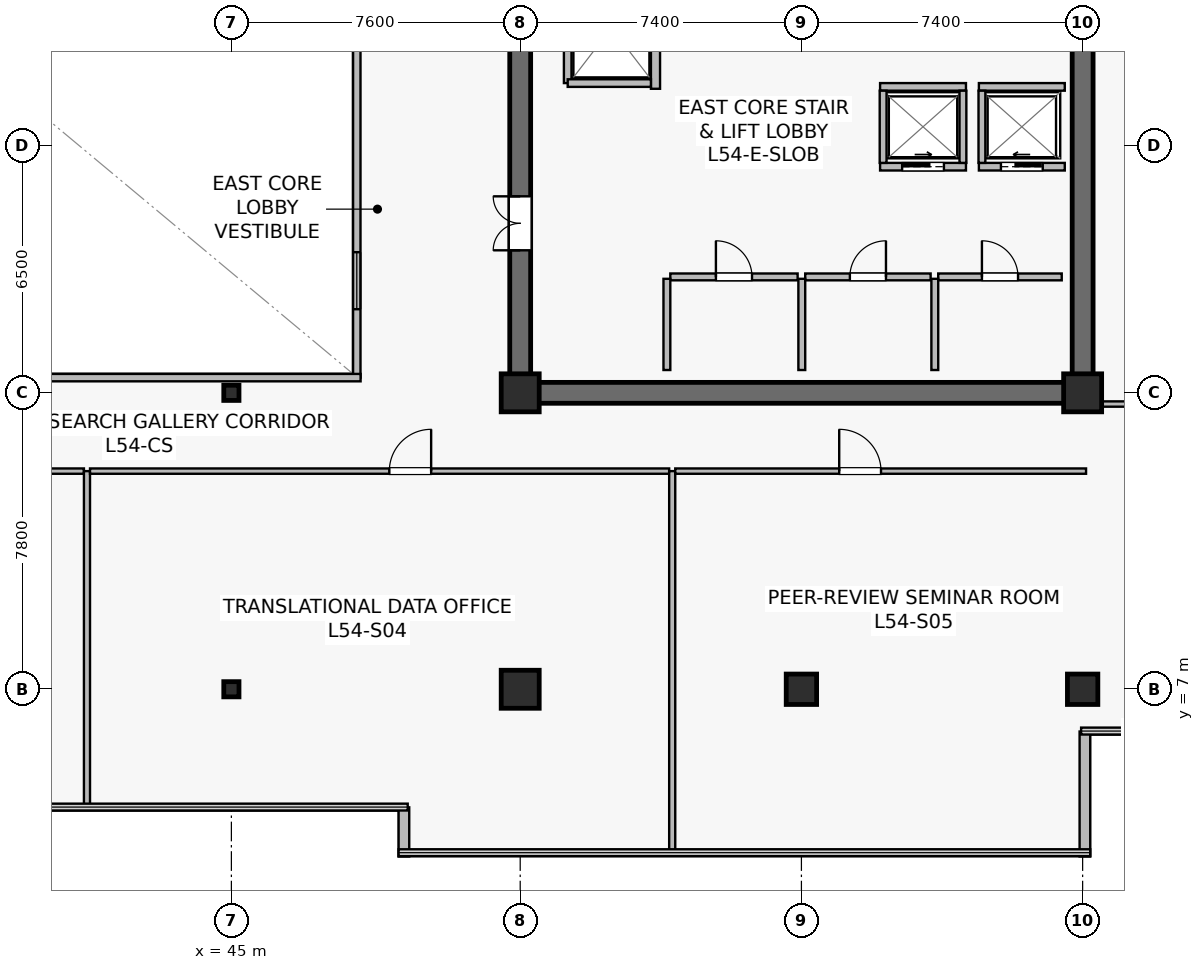
"""IFC4 building model, lengths in metres.
Left out: names, types, materials, properties, quantities, classifications, styles, units other than length and angle.
Written with IfcOpenShell. Run it as: python <this file> out.ifc"""

import sys

from ifc_helpers import new_model, si_unit, direction, frame, frame_2d, origin, origin_2d, place, context, subcontext, project, spatial, rectangle, hollow_rectangle, extrude, source, transform, mapped, element, fill, save


model = new_model("IFC4")
c1 = context("Model", 3, precision=1e-05, world=origin(), true_north=direction((0.0, 1.0)))
c2 = subcontext(c1, "Body", "Model", "MODEL_VIEW")
j1 = project(units=[si_unit("LENGTHUNIT", "METRE"), si_unit("PLANEANGLEUNIT", "RADIAN")], contexts=[c1])
p1 = place(None, origin())
s1 = spatial("IfcSite", under=j1, at=p1, CompositionType="ELEMENT")
p2 = place(p1, origin())
s2 = spatial("IfcBuilding", under=s1, at=p2, CompositionType="ELEMENT")
p3 = place(p2, frame((0.0, 0.0, 226.0)))
s3 = spatial("IfcBuildingStorey", under=s2, at=p3, CompositionType="ELEMENT", Elevation=226.0)
p4 = place(p3, frame((52.325, 14.8, 0.0), z_axis=(0.0, 0.0, 1.0), x_axis=(1.0, 0.0, 0.0)))
e1 = element("IfcWall", 1, at=p4, inside=s3, PredefinedType="SHEAR", context=c2, shape_type="SweptSolid", body=[
    extrude(rectangle(XDim=15.35, YDim=0.55, at=frame_2d((7.675, 0.0))), origin(), (0.0, 0.0, 1.0), 3.8),
])
p5 = place(p3, frame((52.6, 15.075, 0.0), z_axis=(0.0, 0.0, 1.0), x_axis=(0.0, 1.0, 0.0)))
e2 = element("IfcWall", 2, at=p5, inside=s3, PredefinedType="SHEAR", context=c2, shape_type="SweptSolid", body=[
    extrude(rectangle(XDim=18.45, YDim=0.55, at=frame_2d((9.225, 0.0))), origin(), (0.0, 0.0, 1.0), 3.8),
])
p6 = place(p5, frame((3.475, 0.0, 0.0)))
e3 = element("IfcOpeningElement", 3, at=p6, cuts=e2, PredefinedType="OPENING", context=c2, shape_type="SweptSolid", body=[
    extrude(rectangle(XDim=1.42, YDim=2.2, at=frame_2d((0.71, 1.1))), frame((0.0, 0.285, 0.0), z_axis=(0.0, -1.0, 0.0), x_axis=(1.0, 0.0, 0.0)), (0.0, 0.0, 1.0), 0.57),
])
p7 = place(p3, frame((67.4, 15.075, 0.0), z_axis=(0.0, 0.0, 1.0), x_axis=(0.0, 1.0, 0.0)))
e4 = element("IfcWall", 4, at=p7, inside=s3, PredefinedType="SHEAR", context=c2, shape_type="SweptSolid", body=[
    extrude(rectangle(XDim=18.45, YDim=0.55, at=frame_2d((9.225, 0.0))), origin(), (0.0, 0.0, 1.0), 3.8),
])
m1 = source(origin(), c2, "Body", "SweptSolid", [
    extrude(rectangle(XDim=1.0, YDim=1.0, at=origin_2d()), origin(), (0.0, 0.0, 1.0), 4.1),
])
p8 = place(p3, frame((52.6, 7.0, 0.0), z_axis=(0.0, 0.0, 1.0), x_axis=(1.0, 0.0, 0.0)))
e5 = element("IfcColumn", 5, at=p8, inside=s3, PredefinedType="COLUMN", context=c2, shape_type="MappedRepresentation", body=[
    mapped(m1, transform((0.0, 0.0, 0.0), scale=1.0)),
])
m2 = source(origin(), c2, "Body", "SweptSolid", [
    extrude(rectangle(XDim=0.8, YDim=0.8, at=origin_2d()), origin(), (0.0, 0.0, 1.0), 4.1),
])
p9 = place(p3, frame((60.0, 7.0, 0.0), z_axis=(0.0, 0.0, 1.0), x_axis=(1.0, 0.0, 0.0)))
e6 = element("IfcColumn", 6, at=p9, inside=s3, PredefinedType="COLUMN", context=c2, shape_type="MappedRepresentation", body=[
    mapped(m2, transform((0.0, 0.0, 0.0), scale=1.0)),
])
for number, where, z_axis, x_axis in (
    (7, (52.6, 14.8, 0.0), (0.0, 0.0, 1.0), (1.0, 0.0, 0.0)),
    (8, (67.4, 14.8, 0.0), (0.0, 0.0, 1.0), (1.0, 0.0, 0.0)),
):
    element("IfcColumn", number, at=place(p3, frame(where, z_axis=z_axis, x_axis=x_axis)), inside=s3, PredefinedType="COLUMN", context=c2, shape_type="MappedRepresentation", body=[
        mapped(m1, transform((0.0, 0.0, 0.0), scale=1.0)),
    ])
p10 = place(p3, frame((67.4, 7.0, 0.0), z_axis=(0.0, 0.0, 1.0), x_axis=(1.0, 0.0, 0.0)))
e9 = element("IfcColumn", 9, at=p10, inside=s3, PredefinedType="COLUMN", context=c2, shape_type="MappedRepresentation", body=[
    mapped(m2, transform((0.0, 0.0, 0.0), scale=1.0)),
])
m3 = source(origin(), c2, "Body", "SweptSolid", [
    extrude(hollow_rectangle(XDim=0.4, YDim=0.4, WallThickness=0.019, at=origin_2d()), origin(), (0.0, 0.0, 1.0), 4.1),
])
for number, where, z_axis, x_axis in (
    (10, (45.0, 7.0, 0.0), (0.0, 0.0, 1.0), (1.0, 0.0, 0.0)),
    (11, (45.0, 14.8, 0.0), (0.0, 0.0, 1.0), (1.0, 0.0, 0.0)),
):
    element("IfcColumn", number, at=place(p3, frame(where, z_axis=z_axis, x_axis=x_axis)), inside=s3, PredefinedType="COLUMN", context=c2, shape_type="MappedRepresentation", body=[
        mapped(m3, transform((0.0, 0.0, 0.0), scale=1.0)),
    ])
p11 = place(p3, frame((49.54, 3.893, 0.0), z_axis=(0.0, 0.0, 1.0), x_axis=(0.0, -1.0, 0.0)))
e12 = element("IfcWall", 12, at=p11, inside=s3, PredefinedType="STANDARD", context=c2, shape_type="SweptSolid", body=[
    extrude(rectangle(XDim=1.293, YDim=0.28, at=frame_2d((0.646, 0.0))), origin(), (0.0, 0.0, 1.0), 3.8),
])
p12 = place(p3, frame((67.46, 2.6, 0.0), z_axis=(0.0, 0.0, 1.0), x_axis=(0.0, 1.0, 0.0)))
e13 = element("IfcWall", 13, at=p12, inside=s3, PredefinedType="STANDARD", context=c2, shape_type="SweptSolid", body=[
    extrude(rectangle(XDim=3.288, YDim=0.28, at=frame_2d((1.644, 0.0))), origin(), (0.0, 0.0, 1.0), 3.8),
])
p13 = place(p3, frame((56.16, 22.8, 0.0), z_axis=(0.0, 0.0, 1.0), x_axis=(0.0, 1.0, 0.0)))
e14 = element("IfcWall", 14, at=p13, inside=s3, PredefinedType="SOLIDWALL", context=c2, shape_type="SweptSolid", body=[
    extrude(rectangle(XDim=6.85, YDim=0.24, at=frame_2d((3.425, 0.0))), origin(), (0.0, 0.0, 1.0), 2.935),
])
p14 = place(p13, frame((4.85, 0.0, 0.0)))
e15 = element("IfcOpeningElement", 15, at=p14, cuts=e14, PredefinedType="OPENING", context=c2, shape_type="SweptSolid", body=[
    extrude(rectangle(XDim=1.1, YDim=2.22, at=frame_2d((0.55, 1.11))), frame((0.0, 0.13, 0.0), z_axis=(0.0, -1.0, 0.0), x_axis=(1.0, 0.0, 0.0)), (0.0, 0.0, 1.0), 0.26),
])
p15 = place(p13, frame((1.0, 0.0, 0.0)))
e16 = element("IfcOpeningElement", 16, at=p15, cuts=e14, PredefinedType="OPENING", context=c2, shape_type="SweptSolid", body=[
    extrude(rectangle(XDim=1.2, YDim=2.22, at=frame_2d((0.6, 1.11))), frame((0.0, 0.13, 0.0), z_axis=(0.0, -1.0, 0.0), x_axis=(1.0, 0.0, 0.0)), (0.0, 0.0, 1.0), 0.26),
])
p16 = place(p3, frame((64.67, 20.75, 0.0), z_axis=(0.0, 0.0, 1.0), x_axis=(1.0, 0.0, 0.0)))
e17 = element("IfcWall", 17, at=p16, inside=s3, PredefinedType="SOLIDWALL", context=c2, shape_type="SweptSolid", body=[
    extrude(rectangle(XDim=2.26, YDim=0.2, at=frame_2d((1.13, 0.0))), origin(), (0.0, 0.0, 1.0), 3.8),
])
p17 = place(p16, frame((0.58, 0.0, 0.0)))
e18 = element("IfcOpeningElement", 18, at=p17, cuts=e17, PredefinedType="OPENING", context=c2, shape_type="SweptSolid", body=[
    extrude(rectangle(XDim=1.1, YDim=2.22, at=frame_2d((0.55, 1.11))), frame((0.0, 0.11, 0.0), z_axis=(0.0, -1.0, 0.0), x_axis=(1.0, 0.0, 0.0)), (0.0, 0.0, 1.0), 0.22),
])
p18 = place(p3, frame((64.67, 22.85, 0.0), z_axis=(0.0, 0.0, 1.0), x_axis=(1.0, 0.0, 0.0)))
e19 = element("IfcWall", 19, at=p18, inside=s3, PredefinedType="SOLIDWALL", context=c2, shape_type="SweptSolid", body=[
    extrude(rectangle(XDim=2.26, YDim=0.2, at=frame_2d((1.13, 0.0))), origin(), (0.0, 0.0, 1.0), 3.8),
])
p19 = place(p3, frame((64.75, 20.85, 0.0), z_axis=(0.0, 0.0, 1.0), x_axis=(0.0, 1.0, 0.0)))
e20 = element("IfcWall", 20, at=p19, inside=s3, PredefinedType="SOLIDWALL", context=c2, shape_type="SweptSolid", body=[
    extrude(rectangle(XDim=1.9, YDim=0.18, at=frame_2d((0.95, 0.0))), origin(), (0.0, 0.0, 1.0), 3.8),
])
p20 = place(p3, frame((62.07, 20.75, 0.0), z_axis=(0.0, 0.0, 1.0), x_axis=(1.0, 0.0, 0.0)))
e21 = element("IfcWall", 21, at=p20, inside=s3, PredefinedType="SOLIDWALL", context=c2, shape_type="SweptSolid", body=[
    extrude(rectangle(XDim=2.26, YDim=0.2, at=frame_2d((1.13, 0.0))), origin(), (0.0, 0.0, 1.0), 3.8),
])
p21 = place(p20, frame((0.58, 0.0, 0.0)))
e22 = element("IfcOpeningElement", 22, at=p21, cuts=e21, PredefinedType="OPENING", context=c2, shape_type="SweptSolid", body=[
    extrude(rectangle(XDim=1.1, YDim=2.22, at=frame_2d((0.55, 1.11))), frame((0.0, 0.11, 0.0), z_axis=(0.0, -1.0, 0.0), x_axis=(1.0, 0.0, 0.0)), (0.0, 0.0, 1.0), 0.22),
])
p22 = place(p3, frame((62.07, 22.85, 0.0), z_axis=(0.0, 0.0, 1.0), x_axis=(1.0, 0.0, 0.0)))
e23 = element("IfcWall", 23, at=p22, inside=s3, PredefinedType="SOLIDWALL", context=c2, shape_type="SweptSolid", body=[
    extrude(rectangle(XDim=2.26, YDim=0.2, at=frame_2d((1.13, 0.0))), origin(), (0.0, 0.0, 1.0), 3.8),
])
for number, where, z_axis, x_axis in (
    (24, (62.15, 20.85, 0.0), (0.0, 0.0, 1.0), (0.0, 1.0, 0.0)),
    (25, (64.25, 20.85, 0.0), (0.0, 0.0, 1.0), (0.0, 1.0, 0.0)),
):
    element("IfcWall", number, at=place(p3, frame(where, z_axis=z_axis, x_axis=x_axis)), inside=s3, PredefinedType="SOLIDWALL", context=c2, shape_type="SweptSolid", body=[
        extrude(rectangle(XDim=1.9, YDim=0.18, at=frame_2d((0.95, 0.0))), origin(), (0.0, 0.0, 1.0), 3.8),
    ])
p23 = place(p3, frame((53.85, 22.95, 0.0), z_axis=(0.0, 0.0, 1.0), x_axis=(0.0, 1.0, 0.0)))
e26 = element("IfcWall", 26, at=p23, inside=s3, PredefinedType="SOLIDWALL", context=c2, shape_type="SweptSolid", body=[
    extrude(rectangle(XDim=2.9, YDim=0.2, at=frame_2d((1.45, 0.0))), origin(), (0.0, 0.0, 1.0), 2.935),
])
p24 = place(p3, frame((53.85, 22.95, 0.0), z_axis=(0.0, 0.0, 1.0), x_axis=(1.0, 0.0, 0.0)))
e27 = element("IfcWall", 27, at=p24, inside=s3, PredefinedType="SOLIDWALL", context=c2, shape_type="SweptSolid", body=[
    extrude(rectangle(XDim=2.19, YDim=0.2, at=frame_2d((1.095, 0.0))), origin(), (0.0, 0.0, 1.0), 3.8),
])
p25 = place(p3, frame((63.6, 17.85, 0.0), z_axis=(0.0, 0.0, 1.0), x_axis=(1.0, 0.0, 0.0)))
e28 = element("IfcWall", 28, at=p25, inside=s3, PredefinedType="SOLIDWALL", context=c2, shape_type="SweptSolid", body=[
    extrude(rectangle(XDim=3.25, YDim=0.18, at=frame_2d((1.625, 0.0))), origin(), (0.0, 0.0, 1.0), 3.8),
])
p26 = place(p25, frame((1.15, 0.0, 0.0)))
e29 = element("IfcOpeningElement", 29, at=p26, cuts=e28, PredefinedType="OPENING", context=c2, shape_type="SweptSolid", body=[
    extrude(rectangle(XDim=0.95, YDim=2.15, at=frame_2d((0.475, 1.075))), frame((0.0, 0.1, 0.0), z_axis=(0.0, -1.0, 0.0), x_axis=(1.0, 0.0, 0.0)), (0.0, 0.0, 1.0), 0.2),
])
p27 = place(p3, frame((63.51, 15.4, 0.0), z_axis=(0.0, 0.0, 1.0), x_axis=(0.0, 1.0, 0.0)))
e30 = element("IfcWall", 30, at=p27, inside=s3, PredefinedType="SOLIDWALL", context=c2, shape_type="SweptSolid", body=[
    extrude(rectangle(XDim=2.4, YDim=0.18, at=frame_2d((1.2, 0.0))), origin(), (0.0, 0.0, 1.0), 3.8),
])
p28 = place(p3, frame((60.1, 17.85, 0.0), z_axis=(0.0, 0.0, 1.0), x_axis=(1.0, 0.0, 0.0)))
e31 = element("IfcWall", 31, at=p28, inside=s3, PredefinedType="SOLIDWALL", context=c2, shape_type="SweptSolid", body=[
    extrude(rectangle(XDim=3.3, YDim=0.18, at=frame_2d((1.65, 0.0))), origin(), (0.0, 0.0, 1.0), 3.197),
])
p29 = place(p28, frame((1.175, 0.0, 0.0)))
e32 = element("IfcOpeningElement", 32, at=p29, cuts=e31, PredefinedType="OPENING", context=c2, shape_type="SweptSolid", body=[
    extrude(rectangle(XDim=0.95, YDim=2.15, at=frame_2d((0.475, 1.075))), frame((0.0, 0.1, 0.0), z_axis=(0.0, -1.0, 0.0), x_axis=(1.0, 0.0, 0.0)), (0.0, 0.0, 1.0), 0.2),
])
p30 = place(p3, frame((60.01, 15.4, 0.0), z_axis=(0.0, 0.0, 1.0), x_axis=(0.0, 1.0, 0.0)))
e33 = element("IfcWall", 33, at=p30, inside=s3, PredefinedType="SOLIDWALL", context=c2, shape_type="SweptSolid", body=[
    extrude(rectangle(XDim=2.4, YDim=0.18, at=frame_2d((1.2, 0.0))), origin(), (0.0, 0.0, 1.0), 3.197),
])
p31 = place(p3, frame((56.55, 17.85, 0.0), z_axis=(0.0, 0.0, 1.0), x_axis=(1.0, 0.0, 0.0)))
e34 = element("IfcWall", 34, at=p31, inside=s3, PredefinedType="SOLIDWALL", context=c2, shape_type="SweptSolid", body=[
    extrude(rectangle(XDim=3.35, YDim=0.18, at=frame_2d((1.675, 0.0))), origin(), (0.0, 0.0, 1.0), 3.197),
])
p32 = place(p31, frame((1.2, 0.0, 0.0)))
e35 = element("IfcOpeningElement", 35, at=p32, cuts=e34, PredefinedType="OPENING", context=c2, shape_type="SweptSolid", body=[
    extrude(rectangle(XDim=0.95, YDim=2.15, at=frame_2d((0.475, 1.075))), frame((0.0, 0.1, 0.0), z_axis=(0.0, -1.0, 0.0), x_axis=(1.0, 0.0, 0.0)), (0.0, 0.0, 1.0), 0.2),
])
p33 = place(p3, frame((56.46, 15.4, 0.0), z_axis=(0.0, 0.0, 1.0), x_axis=(0.0, 1.0, 0.0)))
e36 = element("IfcWall", 36, at=p33, inside=s3, PredefinedType="SOLIDWALL", context=c2, shape_type="SweptSolid", body=[
    extrude(rectangle(XDim=2.4, YDim=0.18, at=frame_2d((1.2, 0.0))), origin(), (0.0, 0.0, 1.0), 3.8),
])
p34 = place(p3, frame((48.3, 15.2, 0.0), z_axis=(0.0, 0.0, 1.0), x_axis=(0.0, 1.0, 0.0)))
e37 = element("IfcWall", 37, at=p34, inside=s3, PredefinedType="SOLIDWALL", context=c2, shape_type="SweptSolid", body=[
    extrude(rectangle(XDim=18.2, YDim=0.195, at=frame_2d((9.1, 0.0))), origin(), (0.0, 0.0, 1.0), 3.8),
])
p35 = place(p34, frame((1.8, 0.0, 0.9)))
e38 = element("IfcOpeningElement", 38, at=p35, cuts=e37, PredefinedType="OPENING", context=c2, shape_type="SweptSolid", body=[
    extrude(rectangle(XDim=1.5, YDim=1.4, at=frame_2d((0.75, 0.7))), frame((0.0, 0.107, 0.0), z_axis=(0.0, -1.0, 0.0), x_axis=(1.0, 0.0, 0.0)), (0.0, 0.0, 1.0), 0.215),
])
p36 = place(p34, frame((13.2, 0.0, 0.9)))
e39 = element("IfcOpeningElement", 39, at=p36, cuts=e37, PredefinedType="OPENING", context=c2, shape_type="SweptSolid", body=[
    extrude(rectangle(XDim=1.5, YDim=1.4, at=frame_2d((0.75, 0.7))), frame((0.0, 0.107, 0.0), z_axis=(0.0, -1.0, 0.0), x_axis=(1.0, 0.0, 0.0)), (0.0, 0.0, 1.0), 0.215),
])
p37 = place(p3, frame((26.4, 15.2, 0.0), z_axis=(0.0, 0.0, 1.0), x_axis=(1.0, 0.0, 0.0)))
e40 = element("IfcWall", 40, at=p37, inside=s3, PredefinedType="SOLIDWALL", context=c2, shape_type="SweptSolid", body=[
    extrude(rectangle(XDim=22.0, YDim=0.195, at=frame_2d((11.0, 0.0))), origin(), (0.0, 0.0, 1.0), 3.8),
])
p38 = place(p3, frame((26.88, 12.74, 0.0), z_axis=(0.0, 0.0, 1.0), x_axis=(1.0, 0.0, 0.0)))
e41 = element("IfcWall", 41, at=p38, inside=s3, PredefinedType="PARTITIONING", context=c2, shape_type="SweptSolid", body=[
    extrude(rectangle(XDim=14.24, YDim=0.14, at=frame_2d((7.12, 0.0))), origin(), (0.0, 0.0, 1.0), 3.197),
])
p39 = place(p38, frame((5.823, 0.0, 0.0)))
e42 = element("IfcOpeningElement", 42, at=p39, cuts=e41, PredefinedType="OPENING", context=c2, shape_type="SweptSolid", body=[
    extrude(rectangle(XDim=1.1, YDim=2.18, at=frame_2d((0.55, 1.09))), frame((0.0, 0.08, 0.0), z_axis=(0.0, -1.0, 0.0), x_axis=(1.0, 0.0, 0.0)), (0.0, 0.0, 1.0), 0.16),
])
p40 = place(p3, frame((41.2, 3.91, 0.0), z_axis=(0.0, 0.0, 1.0), x_axis=(0.0, 1.0, 0.0)))
e43 = element("IfcWall", 43, at=p40, inside=s3, PredefinedType="PARTITIONING", context=c2, shape_type="SweptSolid", body=[
    extrude(rectangle(XDim=8.83, YDim=0.16, at=frame_2d((4.415, 0.0))), origin(), (0.0, 0.0, 1.0), 3.135),
])
p41 = place(p3, frame((41.28, 12.74, 0.0), z_axis=(0.0, 0.0, 1.0), x_axis=(1.0, 0.0, 0.0)))
e44 = element("IfcWall", 44, at=p41, inside=s3, PredefinedType="PARTITIONING", context=c2, shape_type="SweptSolid", body=[
    extrude(rectangle(XDim=15.24, YDim=0.14, at=frame_2d((7.62, 0.0))), origin(), (0.0, 0.0, 1.0), 3.197),
])
p42 = place(p41, frame((7.876, 0.0, 0.0)))
e45 = element("IfcOpeningElement", 45, at=p42, cuts=e44, PredefinedType="OPENING", context=c2, shape_type="SweptSolid", body=[
    extrude(rectangle(XDim=1.1, YDim=2.18, at=frame_2d((0.55, 1.09))), frame((0.0, 0.08, 0.0), z_axis=(0.0, -1.0, 0.0), x_axis=(1.0, 0.0, 0.0)), (0.0, 0.0, 1.0), 0.16),
])
p43 = place(p3, frame((56.6, 2.71, 0.0), z_axis=(0.0, 0.0, 1.0), x_axis=(0.0, 1.0, 0.0)))
e46 = element("IfcWall", 46, at=p43, inside=s3, PredefinedType="PARTITIONING", context=c2, shape_type="SweptSolid", body=[
    extrude(rectangle(XDim=10.03, YDim=0.16, at=frame_2d((5.015, 0.0))), origin(), (0.0, 0.0, 1.0), 3.135),
])
p44 = place(p3, frame((56.68, 12.74, 0.0), z_axis=(0.0, 0.0, 1.0), x_axis=(1.0, 0.0, 0.0)))
e47 = element("IfcWall", 47, at=p44, inside=s3, PredefinedType="PARTITIONING", context=c2, shape_type="SweptSolid", body=[
    extrude(rectangle(XDim=10.81, YDim=0.14, at=frame_2d((5.405, 0.0))), origin(), (0.0, 0.0, 1.0), 3.197),
])
p45 = place(p44, frame((4.314, 0.0, 0.0)))
e48 = element("IfcOpeningElement", 48, at=p45, cuts=e47, PredefinedType="OPENING", context=c2, shape_type="SweptSolid", body=[
    extrude(rectangle(XDim=1.1, YDim=2.18, at=frame_2d((0.55, 1.09))), frame((0.0, 0.08, 0.0), z_axis=(0.0, -1.0, 0.0), x_axis=(1.0, 0.0, 0.0)), (0.0, 0.0, 1.0), 0.16),
])
p46 = place(p3, frame((67.78, 14.505, 0.0), z_axis=(0.0, 0.0, 1.0), x_axis=(1.0, 0.0, 0.0)))
e49 = element("IfcWall", 49, at=p46, inside=s3, PredefinedType="PARTITIONING", context=c2, shape_type="SweptSolid", body=[
    extrude(rectangle(XDim=2.91, YDim=0.14, at=frame_2d((1.455, 0.0))), origin(), (0.0, 0.0, 1.0), 3.8),
])
p47 = place(p46, frame((1.005, 0.0, 0.0)))
e50 = element("IfcOpeningElement", 50, at=p47, cuts=e49, PredefinedType="OPENING", context=c2, shape_type="SweptSolid", body=[
    extrude(rectangle(XDim=0.9, YDim=2.1, at=frame_2d((0.45, 1.05))), frame((0.0, 0.08, 0.0), z_axis=(0.0, -1.0, 0.0), x_axis=(1.0, 0.0, 0.0)), (0.0, 0.0, 1.0), 0.16),
])
m4 = source(origin(), c2, "Body", "SweptSolid", [
    extrude(rectangle(XDim=1.5, YDim=1.4, at=frame_2d((0.75, 0.7))), frame((0.0, 0.03, 0.0), z_axis=(0.0, -1.0, 0.0), x_axis=(1.0, 0.0, 0.0)), (0.0, 0.0, 1.0), 0.06),
])
p48 = place(p35, origin())
e51 = element("IfcWindow", 51, at=p48, inside=s3, PartitioningType="SINGLE_PANEL", PredefinedType="WINDOW", context=c2, shape_type="MappedRepresentation", body=[
    mapped(m4, transform((0.0, 0.0, 0.0), scale=1.0)),
])
fill(e38, e51)
m5 = source(origin(), c2, "Body", "SweptSolid", [
    extrude(rectangle(XDim=1.1, YDim=2.22, at=frame_2d((0.55, 1.11))), frame((0.0, 0.025, 0.0), z_axis=(0.0, -1.0, 0.0), x_axis=(1.0, 0.0, 0.0)), (0.0, 0.0, 1.0), 0.05),
])
p49 = place(p17, origin())
e52 = element("IfcDoor", 52, at=p49, inside=s3, OperationType="SLIDING_TO_LEFT", PredefinedType="USERDEFINED", context=c2, shape_type="MappedRepresentation", body=[
    mapped(m5, transform((0.0, 0.0, 0.0), scale=1.0)),
])
fill(e18, e52)
p50 = place(p21, origin())
e53 = element("IfcDoor", 53, at=p50, inside=s3, OperationType="SLIDING_TO_RIGHT", PredefinedType="USERDEFINED", context=c2, shape_type="MappedRepresentation", body=[
    mapped(m5, transform((0.0, 0.0, 0.0), scale=1.0)),
])
fill(e22, e53)
m6 = source(origin(), c2, "Body", "SweptSolid", [
    extrude(rectangle(XDim=0.95, YDim=2.15, at=frame_2d((0.475, 1.075))), frame((0.0, 0.025, 0.0), z_axis=(0.0, -1.0, 0.0), x_axis=(1.0, 0.0, 0.0)), (0.0, 0.0, 1.0), 0.05),
])
p51 = place(p26, origin())
e54 = element("IfcDoor", 54, at=p51, inside=s3, OperationType="SINGLE_SWING_LEFT", PredefinedType="DOOR", context=c2, shape_type="MappedRepresentation", body=[
    mapped(m6, transform((0.0, 0.0, 0.0), scale=1.0)),
])
fill(e29, e54)
p52 = place(p29, origin())
e55 = element("IfcDoor", 55, at=p52, inside=s3, OperationType="SINGLE_SWING_RIGHT", PredefinedType="DOOR", context=c2, shape_type="MappedRepresentation", body=[
    mapped(m6, transform((0.0, 0.0, 0.0), scale=1.0)),
])
fill(e32, e55)
p53 = place(p32, origin())
e56 = element("IfcDoor", 56, at=p53, inside=s3, OperationType="SINGLE_SWING_LEFT", PredefinedType="DOOR", context=c2, shape_type="MappedRepresentation", body=[
    mapped(m6, transform((0.0, 0.0, 0.0), scale=1.0)),
])
fill(e35, e56)
m7 = source(origin(), c2, "Body", "SweptSolid", [
    extrude(rectangle(XDim=1.42, YDim=2.2, at=frame_2d((0.71, 1.1))), frame((0.0, 0.025, 0.0), z_axis=(0.0, -1.0, 0.0), x_axis=(1.0, 0.0, 0.0)), (0.0, 0.0, 1.0), 0.05),
])
p54 = place(p6, origin())
e57 = element("IfcDoor", 57, at=p54, inside=s3, OperationType="DOUBLE_DOOR_SINGLE_SWING", PredefinedType="DOOR", context=c2, shape_type="MappedRepresentation", body=[
    mapped(m7, transform((0.0, 0.0, 0.0), scale=1.0)),
])
fill(e3, e57)
m8 = source(origin(), c2, "Body", "SweptSolid", [
    extrude(rectangle(XDim=1.1, YDim=2.18, at=frame_2d((0.55, 1.09))), frame((0.0, 0.025, 0.0), z_axis=(0.0, -1.0, 0.0), x_axis=(1.0, 0.0, 0.0)), (0.0, 0.0, 1.0), 0.05),
])
p55 = place(p42, origin())
e58 = element("IfcDoor", 58, at=p55, inside=s3, OperationType="SINGLE_SWING_RIGHT", PredefinedType="DOOR", context=c2, shape_type="MappedRepresentation", body=[
    mapped(m8, transform((0.0, 0.0, 0.0), scale=1.0)),
])
fill(e45, e58)
p56 = place(p45, origin())
e59 = element("IfcDoor", 59, at=p56, inside=s3, OperationType="SINGLE_SWING_LEFT", PredefinedType="DOOR", context=c2, shape_type="MappedRepresentation", body=[
    mapped(m8, transform((0.0, 0.0, 0.0), scale=1.0)),
])
fill(e48, e59)
save(model, sys.argv[1])
